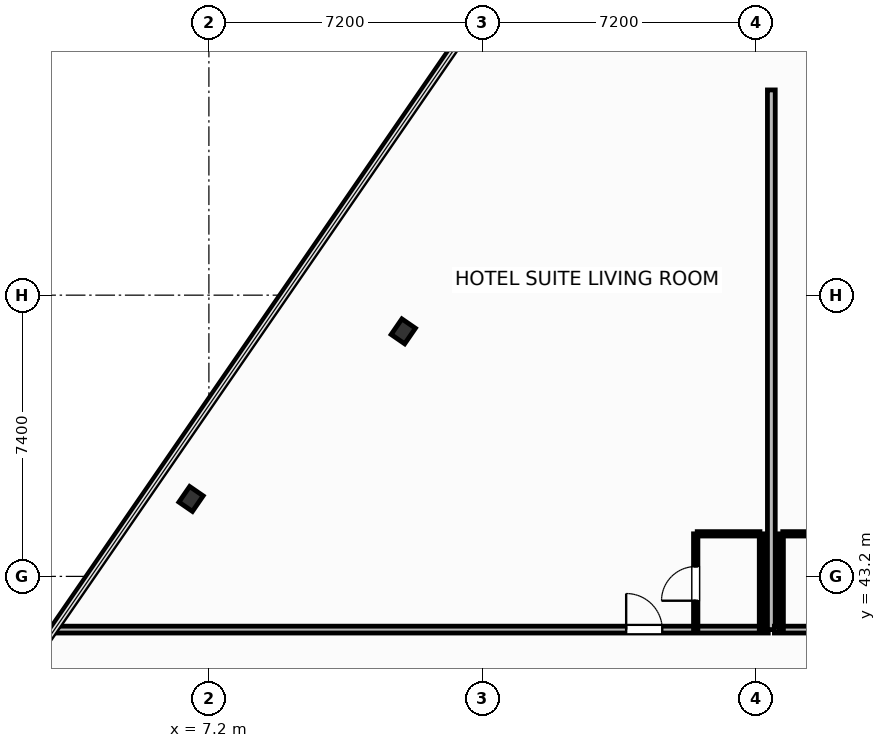
"""IFC4 building model, lengths in metres.
Left out: names, types, materials, properties, quantities, classifications, styles, units other than length and angle.
Written with IfcOpenShell. Run it as: python <this file> out.ifc"""

import sys

from ifc_helpers import new_model, si_unit, direction, frame, frame_2d, origin, origin_2d, place, context, subcontext, project, spatial, rectangle, i_section, extrude, element, fill, save


model = new_model("IFC4")
c1 = context("Model", 3, precision=1e-05, world=origin(), true_north=direction((0.0, 1.0)))
c2 = subcontext(c1, "Body", "Model", "MODEL_VIEW")
j1 = project(units=[si_unit("LENGTHUNIT", "METRE"), si_unit("PLANEANGLEUNIT", "RADIAN")], contexts=[c1])
p1 = place(None, origin())
s1 = spatial("IfcSite", under=j1, at=p1, CompositionType="ELEMENT")
p2 = place(p1, origin())
s2 = spatial("IfcBuilding", under=s1, at=p2, CompositionType="ELEMENT")
p3 = place(p2, frame((0.0, 0.0, 49.2)))
s3 = spatial("IfcBuildingStorey", under=s2, at=p3, CompositionType="ELEMENT", Elevation=49.2)
for number, where, z_axis, x_axis in (
    (1, (12.315, 49.647, 0.0), (0.0, 0.0, 1.0), (0.824, -0.567, 0.0)),
    (2, (6.73, 45.238, 0.0), (0.0, 0.0, 1.0), (0.824, -0.567, 0.0)),
):
    element("IfcColumn", number, at=place(p3, frame(where, z_axis=z_axis, x_axis=x_axis)), inside=s3, PredefinedType="COLUMN", context=c2, shape_type="SweptSolid", body=[
        extrude(i_section(OverallWidth=0.432, OverallDepth=0.498, WebThickness=0.056, FlangeThickness=0.089, FilletRadius=0.025, at=origin_2d()), origin(), (0.0, 0.0, 1.0), 3.7),
    ])
p4 = place(p3, frame((3.176, 41.8, 0.0), z_axis=(0.0, 0.0, 1.0), x_axis=(1.0, 0.0, 0.0)))
e3 = element("IfcWall", 3, at=p4, inside=s3, PredefinedType="PARTITIONING", context=c2, shape_type="SweptSolid", body=[
    extrude(rectangle(XDim=18.744, YDim=0.18, at=frame_2d((9.372, 0.0))), origin(), (0.0, 0.0, 1.0), 3.45),
])
p5 = place(p4, frame((15.004, 0.0, 0.0)))
e4 = element("IfcOpeningElement", 4, at=p5, cuts=e3, PredefinedType="OPENING", context=c2, shape_type="SweptSolid", body=[
    extrude(rectangle(XDim=0.95, YDim=2.15, at=frame_2d((0.475, 1.075))), frame((0.0, 0.1, 0.0), z_axis=(0.0, -1.0, 0.0), x_axis=(1.0, 0.0, 0.0)), (0.0, 0.0, 1.0), 0.2),
])
p6 = place(p3, frame((20.05, 44.32, 0.0), z_axis=(0.0, 0.0, 1.0), x_axis=(1.0, 0.0, 0.0)))
e5 = element("IfcWall", 5, at=p6, inside=s3, PredefinedType="PARTITIONING", context=c2, shape_type="SweptSolid", body=[
    extrude(rectangle(XDim=1.65, YDim=0.115, at=frame_2d((0.825, 0.0))), origin(), (0.0, 0.0, 1.0), 3.45),
])
p7 = place(p3, frame((20.01, 41.8, 0.0), z_axis=(0.0, 0.0, 1.0), x_axis=(0.0, 1.0, 0.0)))
e6 = element("IfcWall", 6, at=p7, inside=s3, PredefinedType="PARTITIONING", context=c2, shape_type="SweptSolid", body=[
    extrude(rectangle(XDim=2.52, YDim=0.115, at=frame_2d((1.26, 0.0))), origin(), (0.0, 0.0, 1.0), 3.45),
])
p8 = place(p7, frame((0.76, 0.0, 0.0)))
e7 = element("IfcOpeningElement", 7, at=p8, cuts=e6, PredefinedType="OPENING", context=c2, shape_type="SweptSolid", body=[
    extrude(rectangle(XDim=0.9, YDim=2.05, at=frame_2d((0.45, 1.025))), frame((0.0, 0.067, 0.0), z_axis=(0.0, -1.0, 0.0), x_axis=(1.0, 0.0, 0.0)), (0.0, 0.0, 1.0), 0.135),
])
p9 = place(p3, frame((21.74, 41.8, 0.0), z_axis=(0.0, 0.0, 1.0), x_axis=(0.0, 1.0, 0.0)))
e8 = element("IfcWall", 8, at=p9, inside=s3, PredefinedType="PARTITIONING", context=c2, shape_type="SweptSolid", body=[
    extrude(rectangle(XDim=2.52, YDim=0.115, at=frame_2d((1.26, 0.0))), origin(), (0.0, 0.0, 1.0), 3.45),
])
p10 = place(p3, frame((22.0, 41.8, 0.0), z_axis=(0.0, 0.0, 1.0), x_axis=(0.0, 1.0, 0.0)))
e9 = element("IfcWall", 9, at=p10, inside=s3, PredefinedType="PARTITIONING", context=c2, shape_type="SweptSolid", body=[
    extrude(rectangle(XDim=14.2, YDim=0.205, at=frame_2d((7.1, 0.0))), origin(), (0.0, 0.0, 1.0), 3.45),
])
p11 = place(p3, frame((22.08, 41.8, 0.0), z_axis=(0.0, 0.0, 1.0), x_axis=(1.0, 0.0, 0.0)))
e10 = element("IfcWall", 10, at=p11, inside=s3, PredefinedType="PARTITIONING", context=c2, shape_type="SweptSolid", body=[
    extrude(rectangle(XDim=11.84, YDim=0.18, at=frame_2d((5.92, 0.0))), origin(), (0.0, 0.0, 1.0), 3.45),
])
p12 = place(p11, frame((3.326, 0.0, 0.0)))
e11 = element("IfcOpeningElement", 11, at=p12, cuts=e10, PredefinedType="OPENING", context=c2, shape_type="SweptSolid", body=[
    extrude(rectangle(XDim=0.95, YDim=2.15, at=frame_2d((0.475, 1.075))), frame((0.0, 0.1, 0.0), z_axis=(0.0, -1.0, 0.0), x_axis=(1.0, 0.0, 0.0)), (0.0, 0.0, 1.0), 0.2),
])
p13 = place(p3, frame((22.3, 44.32, 0.0), z_axis=(0.0, 0.0, 1.0), x_axis=(1.0, 0.0, 0.0)))
e12 = element("IfcWall", 12, at=p13, inside=s3, PredefinedType="PARTITIONING", context=c2, shape_type="SweptSolid", body=[
    extrude(rectangle(XDim=2.15, YDim=0.115, at=frame_2d((1.075, 0.0))), origin(), (0.0, 0.0, 1.0), 3.45),
])
p14 = place(p3, frame((22.26, 41.8, 0.0), z_axis=(0.0, 0.0, 1.0), x_axis=(0.0, 1.0, 0.0)))
e13 = element("IfcWall", 13, at=p14, inside=s3, PredefinedType="PARTITIONING", context=c2, shape_type="SweptSolid", body=[
    extrude(rectangle(XDim=2.52, YDim=0.115, at=frame_2d((1.26, 0.0))), origin(), (0.0, 0.0, 1.0), 3.45),
])
p15 = place(p5, origin())
e14 = element("IfcDoor", 14, at=p15, inside=s3, OperationType="SINGLE_SWING_LEFT", PredefinedType="DOOR", context=c2, shape_type="SweptSolid", body=[
    extrude(rectangle(XDim=0.95, YDim=2.15, at=frame_2d((0.475, 1.075))), frame((0.0, 0.025, 0.0), z_axis=(0.0, -1.0, 0.0), x_axis=(1.0, 0.0, 0.0)), (0.0, 0.0, 1.0), 0.05),
])
fill(e4, e14)
p16 = place(p8, origin())
e15 = element("IfcDoor", 15, at=p16, inside=s3, OperationType="SINGLE_SWING_LEFT", PredefinedType="DOOR", context=c2, shape_type="SweptSolid", body=[
    extrude(rectangle(XDim=0.9, YDim=2.05, at=frame_2d((0.45, 1.025))), frame((0.0, 0.025, 0.0), z_axis=(0.0, -1.0, 0.0), x_axis=(1.0, 0.0, 0.0)), (0.0, 0.0, 1.0), 0.05),
])
fill(e7, e15)
save(model, sys.argv[1])
